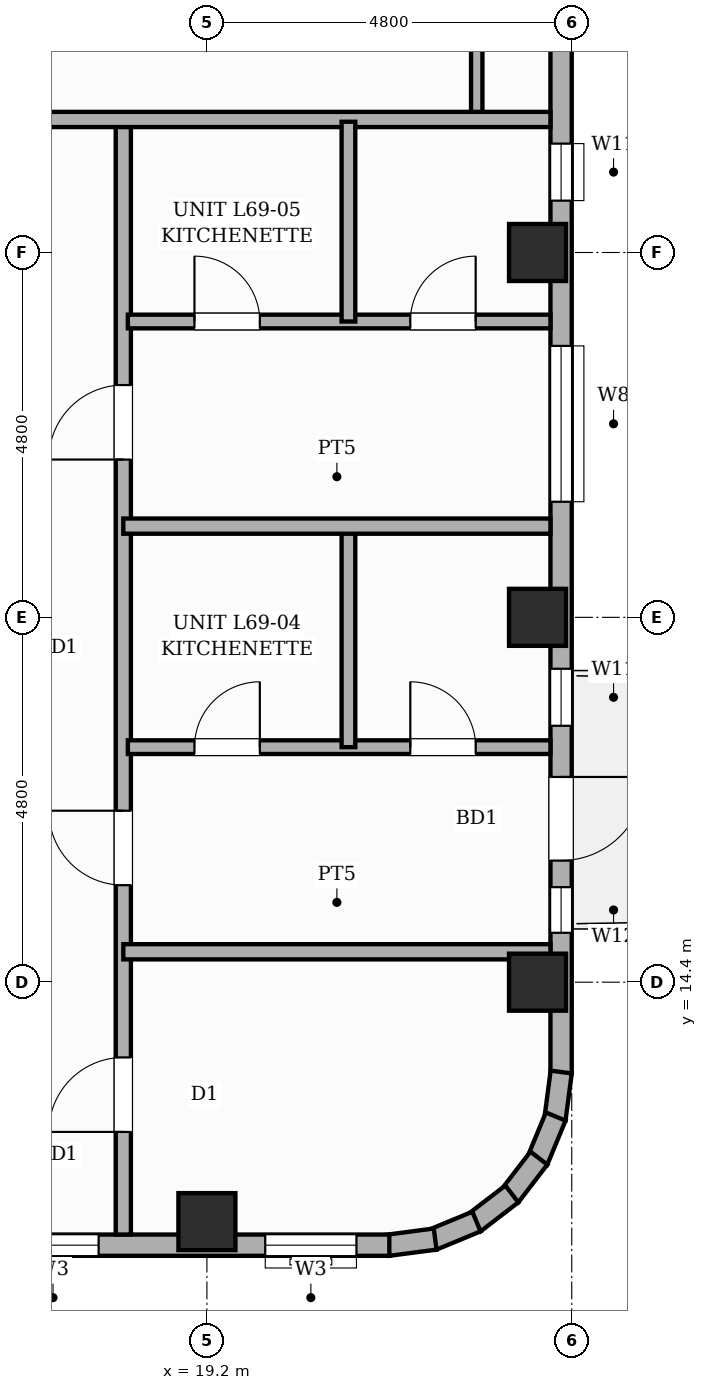
"""IFC4 building model, lengths in metres.
Left out: names, types, materials, properties, quantities, classifications, styles, units other than length and angle.
Written with IfcOpenShell. Run it as: python <this file> out.ifc"""

import sys

from ifc_helpers import new_model, si_unit, direction, frame, frame_2d, origin, origin_2d, place, context, subcontext, project, spatial, rectangle, extrude, element, fill, save


model = new_model("IFC4")
c1 = context("Model", 3, precision=1e-05, world=origin(), true_north=direction((0.0, 1.0)))
c2 = subcontext(c1, "Body", "Model", "MODEL_VIEW")
j1 = project(units=[si_unit("LENGTHUNIT", "METRE"), si_unit("PLANEANGLEUNIT", "RADIAN")], contexts=[c1])
p1 = place(None, origin())
s1 = spatial("IfcSite", under=j1, at=p1, CompositionType="ELEMENT")
p2 = place(p1, origin())
s2 = spatial("IfcBuilding", under=s1, at=p2, CompositionType="ELEMENT")
p3 = place(p2, frame((0.0, 0.0, 265.6)))
s3 = spatial("IfcBuildingStorey", under=s2, at=p3, CompositionType="ELEMENT", Elevation=265.6)
for number, where, z_axis, x_axis in (
    (1, (19.2, 11.25, 0.0), (0.0, 0.0, 1.0), (1.0, 0.0, 0.0)),
    (2, (23.55, 14.4, 0.0), (0.0, 0.0, 1.0), (1.0, 0.0, 0.0)),
    (3, (23.55, 19.2, 0.0), (0.0, 0.0, 1.0), (1.0, 0.0, 0.0)),
    (4, (23.55, 24.0, 0.0), (0.0, 0.0, 1.0), (1.0, 0.0, 0.0)),
):
    element("IfcColumn", number, at=place(p3, frame(where, z_axis=z_axis, x_axis=x_axis)), inside=s3, PredefinedType="COLUMN", context=c2, shape_type="SweptSolid", body=[
        extrude(rectangle(XDim=0.75, YDim=0.75, at=origin_2d()), origin(), (0.0, 0.0, 1.0), 4.3),
    ])
p4 = place(p3, frame((23.86, 45.6, 0.0), z_axis=(0.0, 0.0, 1.0), x_axis=(0.0, -1.0, 0.0)))
e5 = element("IfcWall", 5, at=p4, inside=s3, PredefinedType="STANDARD", context=c2, shape_type="SweptSolid", body=[
    extrude(rectangle(XDim=32.4, YDim=0.28, at=frame_2d((16.2, 0.0))), origin(), (0.0, 0.0, 1.0), 3.32),
])
p5 = place(p4, frame((28.5, 0.0, 0.0)))
e6 = element("IfcOpeningElement", 6, at=p5, cuts=e5, PredefinedType="OPENING", context=c2, shape_type="SweptSolid", body=[
    extrude(rectangle(XDim=1.1, YDim=2.15, at=frame_2d((0.55, 1.075))), frame((0.0, 0.15, 0.0), z_axis=(0.0, -1.0, 0.0), x_axis=(1.0, 0.0, 0.0)), (0.0, 0.0, 1.0), 0.3),
])
p6 = place(p4, frame((29.95, 0.0, 0.45)))
e7 = element("IfcOpeningElement", 7, at=p6, cuts=e5, PredefinedType="OPENING", context=c2, shape_type="SweptSolid", body=[
    extrude(rectangle(XDim=0.6, YDim=1.8, at=frame_2d((0.3, 0.9))), frame((0.0, 0.15, 0.0), z_axis=(0.0, -1.0, 0.0), x_axis=(1.0, 0.0, 0.0)), (0.0, 0.0, 1.0), 0.3),
])
p7 = place(p4, frame((22.829, 0.0, 0.8)))
e8 = element("IfcOpeningElement", 8, at=p7, cuts=e5, PredefinedType="OPENING", context=c2, shape_type="SweptSolid", body=[
    extrude(rectangle(XDim=2.05, YDim=1.95, at=frame_2d((1.025, 0.975))), frame((0.0, 0.15, 0.0), z_axis=(0.0, -1.0, 0.0), x_axis=(1.0, 0.0, 0.0)), (0.0, 0.0, 1.0), 0.3),
])
p8 = place(p4, frame((0.433, 0.0, 0.8)))
e9 = element("IfcOpeningElement", 9, at=p8, cuts=e5, PredefinedType="OPENING", context=c2, shape_type="SweptSolid", body=[
    extrude(rectangle(XDim=1.2, YDim=1.8, at=frame_2d((0.6, 0.9))), frame((0.0, 0.15, 0.0), z_axis=(0.0, -1.0, 0.0), x_axis=(1.0, 0.0, 0.0)), (0.0, 0.0, 1.0), 0.3),
])
p9 = place(p4, frame((27.076, 0.0, 0.45)))
e10 = element("IfcOpeningElement", 10, at=p9, cuts=e5, PredefinedType="OPENING", context=c2, shape_type="SweptSolid", body=[
    extrude(rectangle(XDim=0.75, YDim=1.8, at=frame_2d((0.375, 0.9))), frame((0.0, 0.15, 0.0), z_axis=(0.0, -1.0, 0.0), x_axis=(1.0, 0.0, 0.0)), (0.0, 0.0, 1.0), 0.3),
])
p10 = place(p4, frame((20.167, 0.0, 0.45)))
e11 = element("IfcOpeningElement", 11, at=p10, cuts=e5, PredefinedType="OPENING", context=c2, shape_type="SweptSolid", body=[
    extrude(rectangle(XDim=0.75, YDim=1.8, at=frame_2d((0.375, 0.9))), frame((0.0, 0.15, 0.0), z_axis=(0.0, -1.0, 0.0), x_axis=(1.0, 0.0, 0.0)), (0.0, 0.0, 1.0), 0.3),
])
p11 = place(p3, frame((23.861, 13.218, 0.0), z_axis=(0.0, 0.0, 1.0), x_axis=(-0.130555323746, -0.9914410257, 0.0)))
e12 = element("IfcWall", 12, at=p11, inside=s3, PredefinedType="STANDARD", context=c2, shape_type="SweptSolid", body=[
    extrude(rectangle(XDim=0.626, YDim=0.28, at=frame_2d((0.313, 0.0))), origin(), (0.0, 0.0, 1.0), 4.04),
])
p12 = place(p3, frame((23.789, 12.632, 0.0), z_axis=(0.0, 0.0, 1.0), x_axis=(-0.382455093999, -0.923974080304, 0.0)))
e13 = element("IfcWall", 13, at=p12, inside=s3, PredefinedType="STANDARD", context=c2, shape_type="SweptSolid", body=[
    extrude(rectangle(XDim=0.626, YDim=0.28, at=frame_2d((0.313, 0.0))), origin(), (0.0, 0.0, 1.0), 4.04),
])
for number, where, z_axis, x_axis in (
    (14, (23.567, 12.085, 0.0), (0.0, 0.0, 1.0), (-0.609, -0.793, 0.0)),
    (15, (23.212, 11.614, 0.0), (0.0, 0.0, 1.0), (-0.793, -0.609, 0.0)),
    (16, (22.746, 11.251, 0.0), (0.0, 0.0, 1.0), (-0.924, -0.383, 0.0)),
    (17, (22.203, 11.021, 0.0), (0.0, 0.0, 1.0), (-0.991, -0.131, 0.0)),
):
    element("IfcWall", number, at=place(p3, frame(where, z_axis=z_axis, x_axis=x_axis)), inside=s3, PredefinedType="STANDARD", context=c2, shape_type="SweptSolid", body=[
        extrude(rectangle(XDim=0.626, YDim=0.28, at=frame_2d((0.313, 0.0))), origin(), (0.0, 0.0, 1.0), 4.04),
    ])
p13 = place(p3, frame((21.6, 10.94, 0.0), z_axis=(0.0, 0.0, 1.0), x_axis=(-1.0, 0.0, 0.0)))
e18 = element("IfcWall", 18, at=p13, inside=s3, PredefinedType="STANDARD", context=c2, shape_type="SweptSolid", body=[
    extrude(rectangle(XDim=14.4, YDim=0.28, at=frame_2d((7.2, 0.0))), origin(), (0.0, 0.0, 1.0), 3.32),
])
p14 = place(p13, frame((5.603, 0.0, 0.8)))
e19 = element("IfcOpeningElement", 19, at=p14, cuts=e18, PredefinedType="OPENING", context=c2, shape_type="SweptSolid", body=[
    extrude(rectangle(XDim=0.95, YDim=1.8, at=frame_2d((0.475, 0.9))), frame((0.0, 0.15, 0.0), z_axis=(0.0, -1.0, 0.0), x_axis=(1.0, 0.0, 0.0)), (0.0, 0.0, 1.0), 0.3),
])
p15 = place(p13, frame((3.825, 0.0, 0.8)))
e20 = element("IfcOpeningElement", 20, at=p15, cuts=e18, PredefinedType="OPENING", context=c2, shape_type="SweptSolid", body=[
    extrude(rectangle(XDim=1.2, YDim=1.8, at=frame_2d((0.6, 0.9))), frame((0.0, 0.15, 0.0), z_axis=(0.0, -1.0, 0.0), x_axis=(1.0, 0.0, 0.0)), (0.0, 0.0, 1.0), 0.3),
])
p16 = place(p13, frame((0.433, 0.0, 0.8)))
e21 = element("IfcOpeningElement", 21, at=p16, cuts=e18, PredefinedType="OPENING", context=c2, shape_type="SweptSolid", body=[
    extrude(rectangle(XDim=1.2, YDim=1.8, at=frame_2d((0.6, 0.9))), frame((0.0, 0.15, 0.0), z_axis=(0.0, -1.0, 0.0), x_axis=(1.0, 0.0, 0.0)), (0.0, 0.0, 1.0), 0.3),
])
p17 = place(p3, frame((22.75, 25.75, 0.0), z_axis=(0.0, 0.0, 1.0), x_axis=(0.0, 1.0, 0.0)))
e22 = element("IfcWall", 22, at=p17, inside=s3, PredefinedType="PARTITIONING", context=c2, shape_type="SweptSolid", body=[
    extrude(rectangle(XDim=5.15, YDim=0.15, at=frame_2d((2.575, 0.0))), origin(), (0.0, 0.0, 1.0), 4.04),
])
p18 = place(p3, frame((18.1, 11.08, 0.0), z_axis=(0.0, 0.0, 1.0), x_axis=(0.0, 1.0, 0.0)))
e23 = element("IfcWall", 23, at=p18, inside=s3, PredefinedType="PARTITIONING", context=c2, shape_type="SweptSolid", body=[
    extrude(rectangle(XDim=14.67, YDim=0.2, at=frame_2d((7.335, 0.0))), origin(), (0.0, 0.0, 1.0), 4.04),
])
p19 = place(p18, frame((1.35, 0.0, 0.0)))
e24 = element("IfcOpeningElement", 24, at=p19, cuts=e23, PredefinedType="OPENING", context=c2, shape_type="SweptSolid", body=[
    extrude(rectangle(XDim=0.98, YDim=2.18, at=frame_2d((0.49, 1.09))), frame((0.0, 0.11, 0.0), z_axis=(0.0, -1.0, 0.0), x_axis=(1.0, 0.0, 0.0)), (0.0, 0.0, 1.0), 0.22),
])
p20 = place(p18, frame((4.596, 0.0, 0.0)))
e25 = element("IfcOpeningElement", 25, at=p20, cuts=e23, PredefinedType="OPENING", context=c2, shape_type="SweptSolid", body=[
    extrude(rectangle(XDim=0.98, YDim=2.18, at=frame_2d((0.49, 1.09))), frame((0.0, 0.11, 0.0), z_axis=(0.0, -1.0, 0.0), x_axis=(1.0, 0.0, 0.0)), (0.0, 0.0, 1.0), 0.22),
])
p21 = place(p18, frame((10.196, 0.0, 0.0)))
e26 = element("IfcOpeningElement", 26, at=p21, cuts=e23, PredefinedType="OPENING", context=c2, shape_type="SweptSolid", body=[
    extrude(rectangle(XDim=0.98, YDim=2.18, at=frame_2d((0.49, 1.09))), frame((0.0, 0.11, 0.0), z_axis=(0.0, -1.0, 0.0), x_axis=(1.0, 0.0, 0.0)), (0.0, 0.0, 1.0), 0.22),
])
p22 = place(p3, frame((15.5, 25.75, 0.0), z_axis=(0.0, 0.0, 1.0), x_axis=(1.0, 0.0, 0.0)))
e27 = element("IfcWall", 27, at=p22, inside=s3, PredefinedType="PARTITIONING", context=c2, shape_type="SweptSolid", body=[
    extrude(rectangle(XDim=8.22, YDim=0.2, at=frame_2d((4.11, 0.0))), origin(), (0.0, 0.0, 1.0), 4.04),
])
p23 = place(p3, frame((18.1, 14.8, 0.0), z_axis=(0.0, 0.0, 1.0), x_axis=(1.0, 0.0, 0.0)))
e28 = element("IfcWall", 28, at=p23, inside=s3, PredefinedType="SOLIDWALL", context=c2, shape_type="SweptSolid", body=[
    extrude(rectangle(XDim=5.62, YDim=0.2, at=frame_2d((2.81, 0.0))), origin(), (0.0, 0.0, 1.0), 4.04),
])
p24 = place(p3, frame((18.16, 17.492, 0.0), z_axis=(0.0, 0.0, 1.0), x_axis=(1.0, 0.0, 0.0)))
e29 = element("IfcWall", 29, at=p24, inside=s3, PredefinedType="PLUMBINGWALL", context=c2, shape_type="SweptSolid", body=[
    extrude(rectangle(XDim=5.56, YDim=0.18, at=frame_2d((2.78, 0.0))), origin(), (0.0, 0.0, 1.0), 4.04),
])
p25 = place(p24, frame((0.876, 0.0, 0.0)))
e30 = element("IfcOpeningElement", 30, at=p25, cuts=e29, PredefinedType="OPENING", context=c2, shape_type="SweptSolid", body=[
    extrude(rectangle(XDim=0.86, YDim=2.1, at=frame_2d((0.43, 1.05))), frame((0.0, 0.1, 0.0), z_axis=(0.0, -1.0, 0.0), x_axis=(1.0, 0.0, 0.0)), (0.0, 0.0, 1.0), 0.2),
])
p26 = place(p24, frame((3.716, 0.0, 0.0)))
e31 = element("IfcOpeningElement", 31, at=p26, cuts=e29, PredefinedType="OPENING", context=c2, shape_type="SweptSolid", body=[
    extrude(rectangle(XDim=0.86, YDim=2.1, at=frame_2d((0.43, 1.05))), frame((0.0, 0.1, 0.0), z_axis=(0.0, -1.0, 0.0), x_axis=(1.0, 0.0, 0.0)), (0.0, 0.0, 1.0), 0.2),
])
p27 = place(p3, frame((21.062, 17.492, 0.0), z_axis=(0.0, 0.0, 1.0), x_axis=(0.0, 1.0, 0.0)))
e32 = element("IfcWall", 32, at=p27, inside=s3, PredefinedType="PLUMBINGWALL", context=c2, shape_type="SweptSolid", body=[
    extrude(rectangle(XDim=2.948, YDim=0.18, at=frame_2d((1.474, 0.0))), origin(), (0.0, 0.0, 1.0), 4.04),
])
p28 = place(p3, frame((18.1, 20.4, 0.0), z_axis=(0.0, 0.0, 1.0), x_axis=(1.0, 0.0, 0.0)))
e33 = element("IfcWall", 33, at=p28, inside=s3, PredefinedType="SOLIDWALL", context=c2, shape_type="SweptSolid", body=[
    extrude(rectangle(XDim=5.62, YDim=0.2, at=frame_2d((2.81, 0.0))), origin(), (0.0, 0.0, 1.0), 4.04),
])
p29 = place(p3, frame((18.16, 23.092, 0.0), z_axis=(0.0, 0.0, 1.0), x_axis=(1.0, 0.0, 0.0)))
e34 = element("IfcWall", 34, at=p29, inside=s3, PredefinedType="PLUMBINGWALL", context=c2, shape_type="SweptSolid", body=[
    extrude(rectangle(XDim=5.56, YDim=0.18, at=frame_2d((2.78, 0.0))), origin(), (0.0, 0.0, 1.0), 4.04),
])
p30 = place(p29, frame((0.876, 0.0, 0.0)))
e35 = element("IfcOpeningElement", 35, at=p30, cuts=e34, PredefinedType="OPENING", context=c2, shape_type="SweptSolid", body=[
    extrude(rectangle(XDim=0.86, YDim=2.1, at=frame_2d((0.43, 1.05))), frame((0.0, 0.1, 0.0), z_axis=(0.0, -1.0, 0.0), x_axis=(1.0, 0.0, 0.0)), (0.0, 0.0, 1.0), 0.2),
])
p31 = place(p29, frame((3.716, 0.0, 0.0)))
e36 = element("IfcOpeningElement", 36, at=p31, cuts=e34, PredefinedType="OPENING", context=c2, shape_type="SweptSolid", body=[
    extrude(rectangle(XDim=0.86, YDim=2.1, at=frame_2d((0.43, 1.05))), frame((0.0, 0.1, 0.0), z_axis=(0.0, -1.0, 0.0), x_axis=(1.0, 0.0, 0.0)), (0.0, 0.0, 1.0), 0.2),
])
p32 = place(p3, frame((21.062, 23.092, 0.0), z_axis=(0.0, 0.0, 1.0), x_axis=(0.0, 1.0, 0.0)))
e37 = element("IfcWall", 37, at=p32, inside=s3, PredefinedType="PLUMBINGWALL", context=c2, shape_type="SweptSolid", body=[
    extrude(rectangle(XDim=2.628, YDim=0.18, at=frame_2d((1.314, 0.0))), origin(), (0.0, 0.0, 1.0), 4.04),
])
p33 = place(p5, origin())
e38 = element("IfcDoor", 38, at=p33, inside=s3, OperationType="SINGLE_SWING_LEFT", PredefinedType="DOOR", context=c2, shape_type="SweptSolid", body=[
    extrude(rectangle(XDim=1.1, YDim=2.15, at=frame_2d((0.55, 1.075))), frame((0.0, 0.025, 0.0), z_axis=(0.0, -1.0, 0.0), x_axis=(1.0, 0.0, 0.0)), (0.0, 0.0, 1.0), 0.05),
])
fill(e6, e38)
p34 = place(p6, origin())
e39 = element("IfcWindow", 39, at=p34, inside=s3, PartitioningType="SINGLE_PANEL", PredefinedType="WINDOW", context=c2, shape_type="SweptSolid", body=[
    extrude(rectangle(XDim=0.6, YDim=1.8, at=frame_2d((0.3, 0.9))), frame((0.0, 0.03, 0.0), z_axis=(0.0, -1.0, 0.0), x_axis=(1.0, 0.0, 0.0)), (0.0, 0.0, 1.0), 0.06),
])
fill(e7, e39)
p35 = place(p7, origin())
e40 = element("IfcWindow", 40, at=p35, inside=s3, PartitioningType="SINGLE_PANEL", PredefinedType="WINDOW", context=c2, shape_type="SweptSolid", body=[
    extrude(rectangle(XDim=2.05, YDim=1.95, at=frame_2d((1.025, 0.975))), frame((0.0, 0.03, 0.0), z_axis=(0.0, -1.0, 0.0), x_axis=(1.0, 0.0, 0.0)), (0.0, 0.0, 1.0), 0.06),
])
fill(e8, e40)
p36 = place(p9, origin())
e41 = element("IfcWindow", 41, at=p36, inside=s3, PartitioningType="SINGLE_PANEL", PredefinedType="WINDOW", context=c2, shape_type="SweptSolid", body=[
    extrude(rectangle(XDim=0.75, YDim=1.8, at=frame_2d((0.375, 0.9))), frame((0.0, 0.03, 0.0), z_axis=(0.0, -1.0, 0.0), x_axis=(1.0, 0.0, 0.0)), (0.0, 0.0, 1.0), 0.06),
])
fill(e10, e41)
p37 = place(p10, origin())
e42 = element("IfcWindow", 42, at=p37, inside=s3, PartitioningType="SINGLE_PANEL", PredefinedType="WINDOW", context=c2, shape_type="SweptSolid", body=[
    extrude(rectangle(XDim=0.75, YDim=1.8, at=frame_2d((0.375, 0.9))), frame((0.0, 0.03, 0.0), z_axis=(0.0, -1.0, 0.0), x_axis=(1.0, 0.0, 0.0)), (0.0, 0.0, 1.0), 0.06),
])
fill(e11, e42)
p38 = place(p15, origin())
e43 = element("IfcWindow", 43, at=p38, inside=s3, PartitioningType="SINGLE_PANEL", PredefinedType="WINDOW", context=c2, shape_type="SweptSolid", body=[
    extrude(rectangle(XDim=1.2, YDim=1.8, at=frame_2d((0.6, 0.9))), frame((0.0, 0.03, 0.0), z_axis=(0.0, -1.0, 0.0), x_axis=(1.0, 0.0, 0.0)), (0.0, 0.0, 1.0), 0.06),
])
fill(e20, e43)
p39 = place(p16, origin())
e44 = element("IfcWindow", 44, at=p39, inside=s3, PartitioningType="SINGLE_PANEL", PredefinedType="WINDOW", context=c2, shape_type="SweptSolid", body=[
    extrude(rectangle(XDim=1.2, YDim=1.8, at=frame_2d((0.6, 0.9))), frame((0.0, 0.03, 0.0), z_axis=(0.0, -1.0, 0.0), x_axis=(1.0, 0.0, 0.0)), (0.0, 0.0, 1.0), 0.06),
])
fill(e21, e44)
p40 = place(p19, origin())
e45 = element("IfcDoor", 45, at=p40, inside=s3, OperationType="SINGLE_SWING_LEFT", PredefinedType="DOOR", context=c2, shape_type="SweptSolid", body=[
    extrude(rectangle(XDim=0.98, YDim=2.18, at=frame_2d((0.49, 1.09))), frame((0.0, 0.025, 0.0), z_axis=(0.0, -1.0, 0.0), x_axis=(1.0, 0.0, 0.0)), (0.0, 0.0, 1.0), 0.05),
])
fill(e24, e45)
p41 = place(p20, origin())
e46 = element("IfcDoor", 46, at=p41, inside=s3, OperationType="SINGLE_SWING_RIGHT", PredefinedType="DOOR", context=c2, shape_type="SweptSolid", body=[
    extrude(rectangle(XDim=0.98, YDim=2.18, at=frame_2d((0.49, 1.09))), frame((0.0, 0.025, 0.0), z_axis=(0.0, -1.0, 0.0), x_axis=(1.0, 0.0, 0.0)), (0.0, 0.0, 1.0), 0.05),
])
fill(e25, e46)
p42 = place(p25, origin())
e47 = element("IfcDoor", 47, at=p42, inside=s3, OperationType="SINGLE_SWING_RIGHT", PredefinedType="DOOR", context=c2, shape_type="SweptSolid", body=[
    extrude(rectangle(XDim=0.86, YDim=2.1, at=frame_2d((0.43, 1.05))), frame((0.0, 0.025, 0.0), z_axis=(0.0, -1.0, 0.0), x_axis=(1.0, 0.0, 0.0)), (0.0, 0.0, 1.0), 0.05),
])
fill(e30, e47)
p43 = place(p26, origin())
e48 = element("IfcDoor", 48, at=p43, inside=s3, OperationType="SINGLE_SWING_LEFT", PredefinedType="DOOR", context=c2, shape_type="SweptSolid", body=[
    extrude(rectangle(XDim=0.86, YDim=2.1, at=frame_2d((0.43, 1.05))), frame((0.0, 0.025, 0.0), z_axis=(0.0, -1.0, 0.0), x_axis=(1.0, 0.0, 0.0)), (0.0, 0.0, 1.0), 0.05),
])
fill(e31, e48)
p44 = place(p21, origin())
e49 = element("IfcDoor", 49, at=p44, inside=s3, OperationType="SINGLE_SWING_LEFT", PredefinedType="DOOR", context=c2, shape_type="SweptSolid", body=[
    extrude(rectangle(XDim=0.98, YDim=2.18, at=frame_2d((0.49, 1.09))), frame((0.0, 0.025, 0.0), z_axis=(0.0, -1.0, 0.0), x_axis=(1.0, 0.0, 0.0)), (0.0, 0.0, 1.0), 0.05),
])
fill(e26, e49)
p45 = place(p30, origin())
e50 = element("IfcDoor", 50, at=p45, inside=s3, OperationType="SINGLE_SWING_LEFT", PredefinedType="DOOR", context=c2, shape_type="SweptSolid", body=[
    extrude(rectangle(XDim=0.86, YDim=2.1, at=frame_2d((0.43, 1.05))), frame((0.0, 0.025, 0.0), z_axis=(0.0, -1.0, 0.0), x_axis=(1.0, 0.0, 0.0)), (0.0, 0.0, 1.0), 0.05),
])
fill(e35, e50)
p46 = place(p31, origin())
e51 = element("IfcDoor", 51, at=p46, inside=s3, OperationType="SINGLE_SWING_RIGHT", PredefinedType="DOOR", context=c2, shape_type="SweptSolid", body=[
    extrude(rectangle(XDim=0.86, YDim=2.1, at=frame_2d((0.43, 1.05))), frame((0.0, 0.025, 0.0), z_axis=(0.0, -1.0, 0.0), x_axis=(1.0, 0.0, 0.0)), (0.0, 0.0, 1.0), 0.05),
])
fill(e36, e51)
save(model, sys.argv[1])
